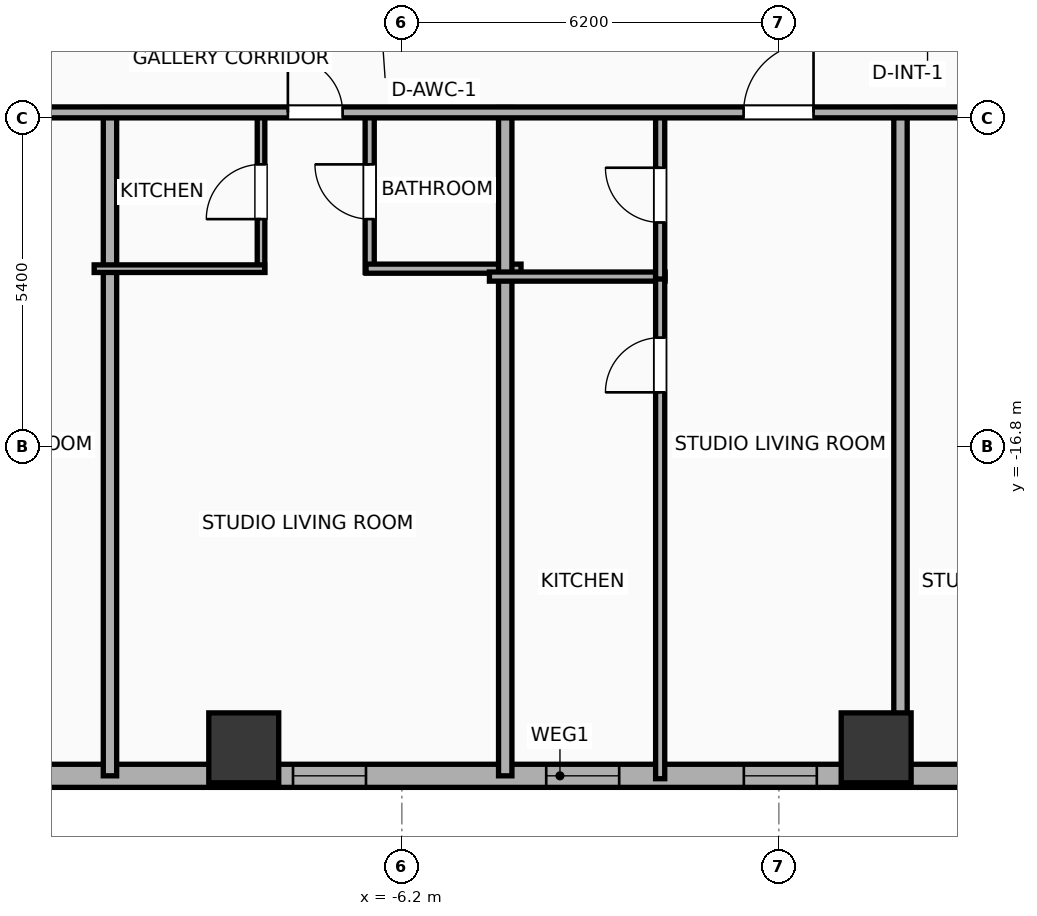
"""IFC4 building model, lengths in metres.
Left out: names, types, materials, properties, quantities, classifications, styles, units other than length and angle.
Written with IfcOpenShell. Run it as: python <this file> out.ifc"""

import sys

from ifc_helpers import new_model, si_unit, direction, frame, frame_2d, origin, origin_2d, place, context, subcontext, project, spatial, rectangle, hollow_rectangle, extrude, element, fill, save


model = new_model("IFC4")
c1 = context("Model", 3, precision=1e-05, world=origin(), true_north=direction((0.0, 1.0)))
c2 = subcontext(c1, "Body", "Model", "MODEL_VIEW")
j1 = project(units=[si_unit("LENGTHUNIT", "METRE"), si_unit("PLANEANGLEUNIT", "RADIAN")], contexts=[c1])
p1 = place(None, origin())
s1 = spatial("IfcSite", under=j1, at=p1, CompositionType="ELEMENT")
p2 = place(p1, origin())
s2 = spatial("IfcBuilding", under=s1, at=p2, CompositionType="ELEMENT")
p3 = place(p2, frame((0.0, 0.0, 49.4)))
s3 = spatial("IfcBuildingStorey", under=s2, at=p3, CompositionType="ELEMENT", Elevation=49.4)
for number, where, z_axis, x_axis in (
    (1, (-8.8, -21.75, 0.0), (0.0, 0.0, 1.0), (1.0, 0.0, 0.0)),
    (2, (1.6, -21.75, 0.0), (0.0, 0.0, 1.0), (1.0, 0.0, 0.0)),
):
    element("IfcColumn", number, at=place(p3, frame(where, z_axis=z_axis, x_axis=x_axis)), inside=s3, PredefinedType="COLUMN", context=c2, shape_type="SweptSolid", body=[
        extrude(hollow_rectangle(XDim=1.15, YDim=1.15, WallThickness=0.04, at=origin_2d()), origin(), (0.0, 0.0, 1.0), 3.9),
    ])
p4 = place(p3, frame((22.381, -22.21, 0.0), z_axis=(0.0, 0.0, 1.0), x_axis=(-1.0, 0.0, 0.0)))
e3 = element("IfcWall", 3, at=p4, inside=s3, PredefinedType="ELEMENTEDWALL", context=c2, shape_type="SweptSolid", body=[
    extrude(rectangle(XDim=51.963, YDim=0.38, at=frame_2d((25.981, 0.0))), origin(), (0.0, 0.0, 1.0), 3.65),
])
p5 = place(p4, frame((49.952, 0.0, 0.75)))
e4 = element("IfcOpeningElement", 4, at=p5, cuts=e3, PredefinedType="OPENING", context=c2, shape_type="SweptSolid", body=[
    extrude(rectangle(XDim=1.2, YDim=2.05, at=frame_2d((0.6, 1.025))), frame((0.0, 0.2, 0.0), z_axis=(0.0, -1.0, 0.0), x_axis=(1.0, 0.0, 0.0)), (0.0, 0.0, 1.0), 0.4),
])
p6 = place(p4, frame((47.486, 0.0, 0.75)))
e5 = element("IfcOpeningElement", 5, at=p6, cuts=e3, PredefinedType="OPENING", context=c2, shape_type="SweptSolid", body=[
    extrude(rectangle(XDim=1.2, YDim=2.05, at=frame_2d((0.6, 1.025))), frame((0.0, 0.2, 0.0), z_axis=(0.0, -1.0, 0.0), x_axis=(1.0, 0.0, 0.0)), (0.0, 0.0, 1.0), 0.4),
])
p7 = place(p4, frame((42.361, 0.0, 0.75)))
e6 = element("IfcOpeningElement", 6, at=p7, cuts=e3, PredefinedType="OPENING", context=c2, shape_type="SweptSolid", body=[
    extrude(rectangle(XDim=0.85, YDim=2.05, at=frame_2d((0.425, 1.025))), frame((0.0, 0.2, 0.0), z_axis=(0.0, -1.0, 0.0), x_axis=(1.0, 0.0, 0.0)), (0.0, 0.0, 1.0), 0.4),
])
p8 = place(p4, frame((44.476, 0.0, 0.75)))
e7 = element("IfcOpeningElement", 7, at=p8, cuts=e3, PredefinedType="OPENING", context=c2, shape_type="SweptSolid", body=[
    extrude(rectangle(XDim=1.2, YDim=2.05, at=frame_2d((0.6, 1.025))), frame((0.0, 0.2, 0.0), z_axis=(0.0, -1.0, 0.0), x_axis=(1.0, 0.0, 0.0)), (0.0, 0.0, 1.0), 0.4),
])
p9 = place(p4, frame((34.811, 0.0, 0.75)))
e8 = element("IfcOpeningElement", 8, at=p9, cuts=e3, PredefinedType="OPENING", context=c2, shape_type="SweptSolid", body=[
    extrude(rectangle(XDim=1.2, YDim=2.05, at=frame_2d((0.6, 1.025))), frame((0.0, 0.2, 0.0), z_axis=(0.0, -1.0, 0.0), x_axis=(1.0, 0.0, 0.0)), (0.0, 0.0, 1.0), 0.4),
])
p10 = place(p4, frame((38.061, 0.0, 0.75)))
e9 = element("IfcOpeningElement", 9, at=p10, cuts=e3, PredefinedType="OPENING", context=c2, shape_type="SweptSolid", body=[
    extrude(rectangle(XDim=1.2, YDim=2.05, at=frame_2d((0.6, 1.025))), frame((0.0, 0.2, 0.0), z_axis=(0.0, -1.0, 0.0), x_axis=(1.0, 0.0, 0.0)), (0.0, 0.0, 1.0), 0.4),
])
p11 = place(p4, frame((29.171, 0.0, 0.75)))
e10 = element("IfcOpeningElement", 10, at=p11, cuts=e3, PredefinedType="OPENING", context=c2, shape_type="SweptSolid", body=[
    extrude(rectangle(XDim=1.2, YDim=2.05, at=frame_2d((0.6, 1.025))), frame((0.0, 0.2, 0.0), z_axis=(0.0, -1.0, 0.0), x_axis=(1.0, 0.0, 0.0)), (0.0, 0.0, 1.0), 0.4),
])
p12 = place(p4, frame((21.757, 0.0, 0.75)))
e11 = element("IfcOpeningElement", 11, at=p12, cuts=e3, PredefinedType="OPENING", context=c2, shape_type="SweptSolid", body=[
    extrude(rectangle(XDim=1.2, YDim=2.05, at=frame_2d((0.6, 1.025))), frame((0.0, 0.2, 0.0), z_axis=(0.0, -1.0, 0.0), x_axis=(1.0, 0.0, 0.0)), (0.0, 0.0, 1.0), 0.4),
])
p13 = place(p4, frame((25.007, 0.0, 0.75)))
e12 = element("IfcOpeningElement", 12, at=p13, cuts=e3, PredefinedType="OPENING", context=c2, shape_type="SweptSolid", body=[
    extrude(rectangle(XDim=1.2, YDim=2.05, at=frame_2d((0.6, 1.025))), frame((0.0, 0.2, 0.0), z_axis=(0.0, -1.0, 0.0), x_axis=(1.0, 0.0, 0.0)), (0.0, 0.0, 1.0), 0.4),
])
p14 = place(p4, frame((17.697, 0.0, 0.75)))
e13 = element("IfcOpeningElement", 13, at=p14, cuts=e3, PredefinedType="OPENING", context=c2, shape_type="SweptSolid", body=[
    extrude(rectangle(XDim=1.2, YDim=2.05, at=frame_2d((0.6, 1.025))), frame((0.0, 0.2, 0.0), z_axis=(0.0, -1.0, 0.0), x_axis=(1.0, 0.0, 0.0)), (0.0, 0.0, 1.0), 0.4),
])
p15 = place(p4, frame((14.447, 0.0, 0.75)))
e14 = element("IfcOpeningElement", 14, at=p15, cuts=e3, PredefinedType="OPENING", context=c2, shape_type="SweptSolid", body=[
    extrude(rectangle(XDim=1.2, YDim=2.05, at=frame_2d((0.6, 1.025))), frame((0.0, 0.2, 0.0), z_axis=(0.0, -1.0, 0.0), x_axis=(1.0, 0.0, 0.0)), (0.0, 0.0, 1.0), 0.4),
])
p16 = place(p4, frame((11.231, 0.0, 0.75)))
e15 = element("IfcOpeningElement", 15, at=p16, cuts=e3, PredefinedType="OPENING", context=c2, shape_type="SweptSolid", body=[
    extrude(rectangle(XDim=1.2, YDim=2.05, at=frame_2d((0.6, 1.025))), frame((0.0, 0.2, 0.0), z_axis=(0.0, -1.0, 0.0), x_axis=(1.0, 0.0, 0.0)), (0.0, 0.0, 1.0), 0.4),
])
p17 = place(p4, frame((5.082, 0.0, 0.75)))
e16 = element("IfcOpeningElement", 16, at=p17, cuts=e3, PredefinedType="OPENING", context=c2, shape_type="SweptSolid", body=[
    extrude(rectangle(XDim=1.2, YDim=2.05, at=frame_2d((0.6, 1.025))), frame((0.0, 0.2, 0.0), z_axis=(0.0, -1.0, 0.0), x_axis=(1.0, 0.0, 0.0)), (0.0, 0.0, 1.0), 0.4),
])
p18 = place(p4, frame((2.277, 0.0, 0.75)))
e17 = element("IfcOpeningElement", 17, at=p18, cuts=e3, PredefinedType="OPENING", context=c2, shape_type="SweptSolid", body=[
    extrude(rectangle(XDim=1.2, YDim=2.05, at=frame_2d((0.6, 1.025))), frame((0.0, 0.2, 0.0), z_axis=(0.0, -1.0, 0.0), x_axis=(1.0, 0.0, 0.0)), (0.0, 0.0, 1.0), 0.4),
])
p19 = place(p4, frame((1.071, 0.0, 0.75)))
e18 = element("IfcOpeningElement", 18, at=p19, cuts=e3, PredefinedType="OPENING", context=c2, shape_type="SweptSolid", body=[
    extrude(rectangle(XDim=0.52, YDim=2.05, at=frame_2d((0.26, 1.025))), frame((0.0, 0.2, 0.0), z_axis=(0.0, -1.0, 0.0), x_axis=(1.0, 0.0, 0.0)), (0.0, 0.0, 1.0), 0.4),
])
p20 = place(p3, frame((-11.0, -22.21, 0.0), z_axis=(0.0, 0.0, 1.0), x_axis=(0.0, 1.0, 0.0)))
e19 = element("IfcWall", 19, at=p20, inside=s3, PredefinedType="PARTITIONING", context=c2, shape_type="SweptSolid", body=[
    extrude(rectangle(XDim=10.99, YDim=0.22, at=frame_2d((5.495, 0.0))), origin(), (0.0, 0.0, 1.0), 2.94),
])
p21 = place(p3, frame((-8.516, -13.93, 0.0), z_axis=(0.0, 0.0, 1.0), x_axis=(0.0, 1.0, 0.0)))
e20 = element("IfcWall", 20, at=p21, inside=s3, PredefinedType="PARTITIONING", context=c2, shape_type="SweptSolid", body=[
    extrude(rectangle(XDim=2.65, YDim=0.125, at=frame_2d((1.325, 0.0))), origin(), (0.0, 0.0, 1.0), 3.65),
])
p22 = place(p21, frame((0.875, 0.0, 0.0)))
e21 = element("IfcOpeningElement", 21, at=p22, cuts=e20, PredefinedType="OPENING", context=c2, shape_type="SweptSolid", body=[
    extrude(rectangle(XDim=0.9, YDim=2.05, at=frame_2d((0.45, 1.025))), frame((0.0, 0.073, 0.0), z_axis=(0.0, -1.0, 0.0), x_axis=(1.0, 0.0, 0.0)), (0.0, 0.0, 1.0), 0.145),
])
p23 = place(p3, frame((-6.729, -13.93, 0.0), z_axis=(0.0, 0.0, 1.0), x_axis=(0.0, 1.0, 0.0)))
e22 = element("IfcWall", 22, at=p23, inside=s3, PredefinedType="PLUMBINGWALL", context=c2, shape_type="SweptSolid", body=[
    extrude(rectangle(XDim=2.65, YDim=0.15, at=frame_2d((1.325, 0.0))), origin(), (0.0, 0.0, 1.0), 3.65),
])
p24 = place(p23, frame((0.875, 0.0, 0.0)))
e23 = element("IfcOpeningElement", 23, at=p24, cuts=e22, PredefinedType="OPENING", context=c2, shape_type="SweptSolid", body=[
    extrude(rectangle(XDim=0.9, YDim=2.05, at=frame_2d((0.45, 1.025))), frame((0.0, 0.085, 0.0), z_axis=(0.0, -1.0, 0.0), x_axis=(1.0, 0.0, 0.0)), (0.0, 0.0, 1.0), 0.17),
])
p25 = place(p3, frame((-11.26, -13.87, 0.0), z_axis=(0.0, 0.0, 1.0), x_axis=(1.0, 0.0, 0.0)))
e24 = element("IfcWall", 24, at=p25, inside=s3, PredefinedType="PARTITIONING", context=c2, shape_type="SweptSolid", body=[
    extrude(rectangle(XDim=2.804, YDim=0.125, at=frame_2d((1.402, 0.0))), origin(), (0.0, 0.0, 1.0), 3.65),
])
p26 = place(p3, frame((-6.789, -13.87, 0.0), z_axis=(0.0, 0.0, 1.0), x_axis=(1.0, 0.0, 0.0)))
e25 = element("IfcWall", 25, at=p26, inside=s3, PredefinedType="PLUMBINGWALL", context=c2, shape_type="SweptSolid", body=[
    extrude(rectangle(XDim=2.549, YDim=0.15, at=frame_2d((1.274, 0.0))), origin(), (0.0, 0.0, 1.0), 3.65),
])
p27 = place(p3, frame((-4.5, -22.21, 0.0), z_axis=(0.0, 0.0, 1.0), x_axis=(0.0, 1.0, 0.0)))
e26 = element("IfcWall", 26, at=p27, inside=s3, PredefinedType="PARTITIONING", context=c2, shape_type="SweptSolid", body=[
    extrude(rectangle(XDim=10.99, YDim=0.22, at=frame_2d((5.495, 0.0))), origin(), (0.0, 0.0, 1.0), 3.65),
])
p28 = place(p3, frame((-4.76, -14.0, 0.0), z_axis=(0.0, 0.0, 1.0), x_axis=(1.0, 0.0, 0.0)))
e27 = element("IfcWall", 27, at=p28, inside=s3, PredefinedType="PLUMBINGWALL", context=c2, shape_type="SweptSolid", body=[
    extrude(rectangle(XDim=2.888, YDim=0.15, at=frame_2d((1.444, 0.0))), origin(), (0.0, 0.0, 1.0), 3.65),
])
p29 = place(p3, frame((-1.952, -22.258, 0.0), z_axis=(0.0, 0.0, 1.0), x_axis=(0.0, 1.0, 0.0)))
e28 = element("IfcWall", 28, at=p29, inside=s3, PredefinedType="PLUMBINGWALL", context=c2, shape_type="SweptSolid", body=[
    extrude(rectangle(XDim=8.298, YDim=0.15, at=frame_2d((4.149, 0.0))), origin(), (0.0, 0.0, 1.0), 3.65),
])
p30 = place(p29, frame((6.354, 0.0, 0.0)))
e29 = element("IfcOpeningElement", 29, at=p30, cuts=e28, PredefinedType="OPENING", context=c2, shape_type="SweptSolid", body=[
    extrude(rectangle(XDim=0.9, YDim=2.05, at=frame_2d((0.45, 1.025))), frame((0.0, 0.085, 0.0), z_axis=(0.0, -1.0, 0.0), x_axis=(1.0, 0.0, 0.0)), (0.0, 0.0, 1.0), 0.17),
])
p31 = place(p3, frame((-1.952, -14.04, 0.0), z_axis=(0.0, 0.0, 1.0), x_axis=(0.0, 1.0, 0.0)))
e30 = element("IfcWall", 30, at=p31, inside=s3, PredefinedType="PLUMBINGWALL", context=c2, shape_type="SweptSolid", body=[
    extrude(rectangle(XDim=2.76, YDim=0.15, at=frame_2d((1.38, 0.0))), origin(), (0.0, 0.0, 1.0), 3.65),
])
p32 = place(p31, frame((0.93, 0.0, 0.0)))
e31 = element("IfcOpeningElement", 31, at=p32, cuts=e30, PredefinedType="OPENING", context=c2, shape_type="SweptSolid", body=[
    extrude(rectangle(XDim=0.9, YDim=2.05, at=frame_2d((0.45, 1.025))), frame((0.0, 0.085, 0.0), z_axis=(0.0, -1.0, 0.0), x_axis=(1.0, 0.0, 0.0)), (0.0, 0.0, 1.0), 0.17),
])
p33 = place(p3, frame((2.0, -22.21, 0.0), z_axis=(0.0, 0.0, 1.0), x_axis=(0.0, 1.0, 0.0)))
e32 = element("IfcWall", 32, at=p33, inside=s3, PredefinedType="PARTITIONING", context=c2, shape_type="SweptSolid", body=[
    extrude(rectangle(XDim=10.99, YDim=0.22, at=frame_2d((5.495, 0.0))), origin(), (0.0, 0.0, 1.0), 2.94),
])
p34 = place(p3, frame((-33.41, -11.3, 0.0), z_axis=(0.0, 0.0, 1.0), x_axis=(1.0, 0.0, 0.0)))
e33 = element("IfcWall", 33, at=p34, inside=s3, PredefinedType="PARTITIONING", context=c2, shape_type="SweptSolid", body=[
    extrude(rectangle(XDim=59.62, YDim=0.18, at=frame_2d((29.81, 0.0))), origin(), (0.0, 0.0, 1.0), 3.65),
])
p35 = place(p34, frame((4.344, 0.0, 0.0)))
e34 = element("IfcOpeningElement", 34, at=p35, cuts=e33, PredefinedType="OPENING", context=c2, shape_type="SweptSolid", body=[
    extrude(rectangle(XDim=1.15, YDim=2.05, at=frame_2d((0.575, 1.025))), frame((0.0, 0.1, 0.0), z_axis=(0.0, -1.0, 0.0), x_axis=(1.0, 0.0, 0.0)), (0.0, 0.0, 1.0), 0.2),
])
p36 = place(p34, frame((13.358, 0.0, 0.0)))
e35 = element("IfcOpeningElement", 35, at=p36, cuts=e33, PredefinedType="OPENING", context=c2, shape_type="SweptSolid", body=[
    extrude(rectangle(XDim=1.15, YDim=2.05, at=frame_2d((0.575, 1.025))), frame((0.0, 0.1, 0.0), z_axis=(0.0, -1.0, 0.0), x_axis=(1.0, 0.0, 0.0)), (0.0, 0.0, 1.0), 0.2),
])
p37 = place(p34, frame((19.773, 0.0, 0.0)))
e36 = element("IfcOpeningElement", 36, at=p37, cuts=e33, PredefinedType="OPENING", context=c2, shape_type="SweptSolid", body=[
    extrude(rectangle(XDim=1.15, YDim=2.05, at=frame_2d((0.575, 1.025))), frame((0.0, 0.1, 0.0), z_axis=(0.0, -1.0, 0.0), x_axis=(1.0, 0.0, 0.0)), (0.0, 0.0, 1.0), 0.2),
])
p38 = place(p34, frame((25.336, 0.0, 0.0)))
e37 = element("IfcOpeningElement", 37, at=p38, cuts=e33, PredefinedType="OPENING", context=c2, shape_type="SweptSolid", body=[
    extrude(rectangle(XDim=0.9, YDim=2.05, at=frame_2d((0.45, 1.025))), frame((0.0, 0.1, 0.0), z_axis=(0.0, -1.0, 0.0), x_axis=(1.0, 0.0, 0.0)), (0.0, 0.0, 1.0), 0.2),
])
p39 = place(p34, frame((32.83, 0.0, 0.0)))
e38 = element("IfcOpeningElement", 38, at=p39, cuts=e33, PredefinedType="OPENING", context=c2, shape_type="SweptSolid", body=[
    extrude(rectangle(XDim=1.15, YDim=2.05, at=frame_2d((0.575, 1.025))), frame((0.0, 0.1, 0.0), z_axis=(0.0, -1.0, 0.0), x_axis=(1.0, 0.0, 0.0)), (0.0, 0.0, 1.0), 0.2),
])
p40 = place(p34, frame((36.95, 0.0, 0.0)))
e39 = element("IfcOpeningElement", 39, at=p40, cuts=e33, PredefinedType="OPENING", context=c2, shape_type="SweptSolid", body=[
    extrude(rectangle(XDim=1.15, YDim=2.05, at=frame_2d((0.575, 1.025))), frame((0.0, 0.1, 0.0), z_axis=(0.0, -1.0, 0.0), x_axis=(1.0, 0.0, 0.0)), (0.0, 0.0, 1.0), 0.2),
])
p41 = place(p34, frame((44.837, 0.0, 0.0)))
e40 = element("IfcOpeningElement", 40, at=p41, cuts=e33, PredefinedType="OPENING", context=c2, shape_type="SweptSolid", body=[
    extrude(rectangle(XDim=0.9, YDim=2.05, at=frame_2d((0.45, 1.025))), frame((0.0, 0.1, 0.0), z_axis=(0.0, -1.0, 0.0), x_axis=(1.0, 0.0, 0.0)), (0.0, 0.0, 1.0), 0.2),
])
p42 = place(p34, frame((49.565, 0.0, 0.0)))
e41 = element("IfcOpeningElement", 41, at=p42, cuts=e33, PredefinedType="OPENING", context=c2, shape_type="SweptSolid", body=[
    extrude(rectangle(XDim=1.15, YDim=2.05, at=frame_2d((0.575, 1.025))), frame((0.0, 0.1, 0.0), z_axis=(0.0, -1.0, 0.0), x_axis=(1.0, 0.0, 0.0)), (0.0, 0.0, 1.0), 0.2),
])
p43 = place(p34, frame((56.583, 0.0, 0.0)))
e42 = element("IfcOpeningElement", 42, at=p43, cuts=e33, PredefinedType="OPENING", context=c2, shape_type="SweptSolid", body=[
    extrude(rectangle(XDim=0.9, YDim=2.05, at=frame_2d((0.45, 1.025))), frame((0.0, 0.1, 0.0), z_axis=(0.0, -1.0, 0.0), x_axis=(1.0, 0.0, 0.0)), (0.0, 0.0, 1.0), 0.2),
])
p44 = place(p11, origin())
e43 = element("IfcWindow", 43, at=p44, inside=s3, PartitioningType="SINGLE_PANEL", PredefinedType="WINDOW", context=c2, shape_type="SweptSolid", body=[
    extrude(rectangle(XDim=1.2, YDim=2.05, at=frame_2d((0.6, 1.025))), frame((0.0, 0.03, 0.0), z_axis=(0.0, -1.0, 0.0), x_axis=(1.0, 0.0, 0.0)), (0.0, 0.0, 1.0), 0.06),
])
fill(e10, e43)
p45 = place(p12, origin())
e44 = element("IfcWindow", 44, at=p45, inside=s3, PartitioningType="SINGLE_PANEL", PredefinedType="WINDOW", context=c2, shape_type="SweptSolid", body=[
    extrude(rectangle(XDim=1.2, YDim=2.05, at=frame_2d((0.6, 1.025))), frame((0.0, 0.03, 0.0), z_axis=(0.0, -1.0, 0.0), x_axis=(1.0, 0.0, 0.0)), (0.0, 0.0, 1.0), 0.06),
])
fill(e11, e44)
p46 = place(p13, origin())
e45 = element("IfcWindow", 45, at=p46, inside=s3, PartitioningType="SINGLE_PANEL", PredefinedType="WINDOW", context=c2, shape_type="SweptSolid", body=[
    extrude(rectangle(XDim=1.2, YDim=2.05, at=frame_2d((0.6, 1.025))), frame((0.0, 0.03, 0.0), z_axis=(0.0, -1.0, 0.0), x_axis=(1.0, 0.0, 0.0)), (0.0, 0.0, 1.0), 0.06),
])
fill(e12, e45)
p47 = place(p22, origin())
e46 = element("IfcDoor", 46, at=p47, inside=s3, OperationType="SINGLE_SWING_LEFT", PredefinedType="DOOR", context=c2, shape_type="SweptSolid", body=[
    extrude(rectangle(XDim=0.9, YDim=2.05, at=frame_2d((0.45, 1.025))), frame((0.0, 0.025, 0.0), z_axis=(0.0, -1.0, 0.0), x_axis=(1.0, 0.0, 0.0)), (0.0, 0.0, 1.0), 0.05),
])
fill(e21, e46)
p48 = place(p24, origin())
e47 = element("IfcDoor", 47, at=p48, inside=s3, OperationType="SINGLE_SWING_RIGHT", PredefinedType="DOOR", context=c2, shape_type="SweptSolid", body=[
    extrude(rectangle(XDim=0.9, YDim=2.05, at=frame_2d((0.45, 1.025))), frame((0.0, 0.025, 0.0), z_axis=(0.0, -1.0, 0.0), x_axis=(1.0, 0.0, 0.0)), (0.0, 0.0, 1.0), 0.05),
])
fill(e23, e47)
p49 = place(p30, origin())
e48 = element("IfcDoor", 48, at=p49, inside=s3, OperationType="SINGLE_SWING_LEFT", PredefinedType="DOOR", context=c2, shape_type="SweptSolid", body=[
    extrude(rectangle(XDim=0.9, YDim=2.05, at=frame_2d((0.45, 1.025))), frame((0.0, 0.025, 0.0), z_axis=(0.0, -1.0, 0.0), x_axis=(1.0, 0.0, 0.0)), (0.0, 0.0, 1.0), 0.05),
])
fill(e29, e48)
p50 = place(p32, origin())
e49 = element("IfcDoor", 49, at=p50, inside=s3, OperationType="SINGLE_SWING_RIGHT", PredefinedType="DOOR", context=c2, shape_type="SweptSolid", body=[
    extrude(rectangle(XDim=0.9, YDim=2.05, at=frame_2d((0.45, 1.025))), frame((0.0, 0.025, 0.0), z_axis=(0.0, -1.0, 0.0), x_axis=(1.0, 0.0, 0.0)), (0.0, 0.0, 1.0), 0.05),
])
fill(e31, e49)
p51 = place(p38, origin())
e50 = element("IfcDoor", 50, at=p51, inside=s3, OperationType="SINGLE_SWING_LEFT", PredefinedType="DOOR", context=c2, shape_type="SweptSolid", body=[
    extrude(rectangle(XDim=0.9, YDim=2.05, at=frame_2d((0.45, 1.025))), frame((0.0, 0.025, 0.0), z_axis=(0.0, -1.0, 0.0), x_axis=(1.0, 0.0, 0.0)), (0.0, 0.0, 1.0), 0.05),
])
fill(e37, e50)
p52 = place(p39, origin())
e51 = element("IfcDoor", 51, at=p52, inside=s3, OperationType="SINGLE_SWING_RIGHT", PredefinedType="DOOR", context=c2, shape_type="SweptSolid", body=[
    extrude(rectangle(XDim=1.15, YDim=2.05, at=frame_2d((0.575, 1.025))), frame((0.0, 0.025, 0.0), z_axis=(0.0, -1.0, 0.0), x_axis=(1.0, 0.0, 0.0)), (0.0, 0.0, 1.0), 0.05),
])
fill(e38, e51)
save(model, sys.argv[1])
